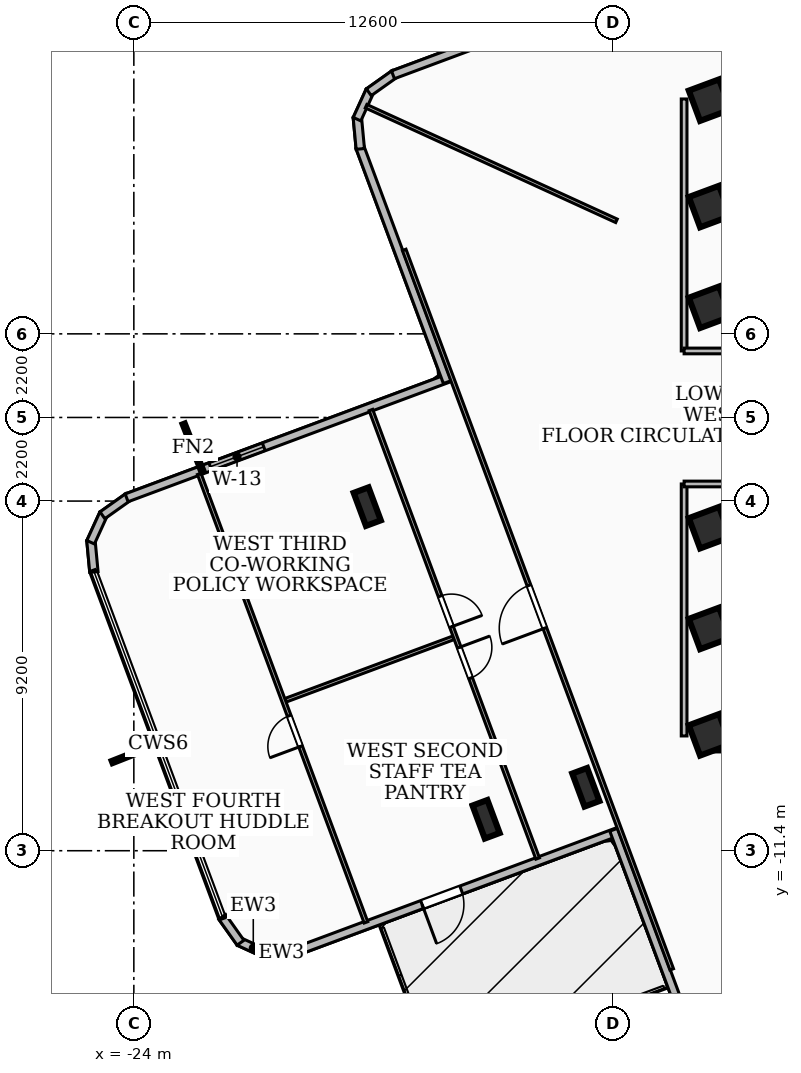
"""IFC4 building model, lengths in metres.
Left out: names, types, materials, properties, quantities, classifications, styles, units other than length and angle.
Written with IfcOpenShell. Run it as: python <this file> out.ifc"""

import sys

from ifc_helpers import new_model, si_unit, direction, frame, frame_2d, origin, origin_2d, place, context, subcontext, project, spatial, rectangle, i_section, extrude, element, fill, save


model = new_model("IFC4")
c1 = context("Model", 3, precision=1e-05, world=origin(), true_north=direction((0.0, 1.0)))
c2 = subcontext(c1, "Body", "Model", "MODEL_VIEW")
j1 = project(units=[si_unit("LENGTHUNIT", "METRE"), si_unit("PLANEANGLEUNIT", "RADIAN")], contexts=[c1])
p1 = place(None, origin())
s1 = spatial("IfcSite", under=j1, at=p1, CompositionType="ELEMENT")
p2 = place(p1, origin())
s2 = spatial("IfcBuilding", under=s1, at=p2, CompositionType="ELEMENT")
p3 = place(p2, frame((0.0, 0.0, 170.28)))
s3 = spatial("IfcBuildingStorey", under=s2, at=p3, CompositionType="ELEMENT", Elevation=170.28)
for number, where, z_axis, x_axis in (
    (1, (-8.78, 8.535, 0.0), (0.0, 0.0, 1.0), (1.0, 0.0, 0.0)),
    (2, (8.78, -8.535, 0.0), (0.0, 0.0, 1.0), (-1.0, 0.0, 0.0)),
):
    element("IfcWall", number, at=place(p3, frame(where, z_axis=z_axis, x_axis=x_axis)), inside=s3, PredefinedType="SHEAR", context=c2, shape_type="SweptSolid", body=[
        extrude(rectangle(XDim=17.56, YDim=0.45, at=frame_2d((8.78, 0.0))), origin(), (0.0, 0.0, 1.0), 3.34),
    ])
for number, where, z_axis, x_axis in (
    (3, (-8.85, -5.55, 0.0), (0.0, 0.0, 1.0), (0.937, 0.349, 0.0)),
    (4, (-8.85, -2.9, 0.0), (0.0, 0.0, 1.0), (0.937, 0.349, 0.0)),
    (5, (-8.85, 2.9, 0.0), (0.0, 0.0, 1.0), (0.937, 0.349, 0.0)),
    (6, (-8.85, 5.55, 0.0), (0.0, 0.0, 1.0), (0.937, 0.349, 0.0)),
    (7, (-8.85, 8.35, 0.0), (0.0, 0.0, 1.0), (0.937, 0.349, 0.0)),
    (8, (-8.85, -8.35, 0.0), (0.0, 0.0, 1.0), (0.937, 0.349, 0.0)),
):
    element("IfcColumn", number, at=place(p3, frame(where, z_axis=z_axis, x_axis=x_axis)), inside=s3, PredefinedType="COLUMN", context=c2, shape_type="SweptSolid", body=[
        extrude(rectangle(XDim=0.85, YDim=0.85, at=origin_2d()), origin(), (0.0, 0.0, 1.0), 3.6),
    ])
for number, where, z_axis, x_axis in (
    (9, (-17.858, -2.346, 0.0), (0.0, 0.0, 1.0), (0.937, 0.349, 0.0)),
    (10, (-12.106, -9.731, 0.0), (0.0, 0.0, 1.0), (0.937, 0.349, 0.0)),
    (11, (-20.535, -3.788, 0.0), (0.0, 0.0, 1.0), (0.937, 0.349, 0.0)),
    (12, (-14.731, -10.573, 0.0), (0.0, 0.0, 1.0), (0.937, 0.349, 0.0)),
):
    element("IfcColumn", number, at=place(p3, frame(where, z_axis=z_axis, x_axis=x_axis)), inside=s3, PredefinedType="COLUMN", context=c2, shape_type="SweptSolid", body=[
        extrude(i_section(OverallWidth=0.418, OverallDepth=0.927, WebThickness=0.019, FlangeThickness=0.032, at=origin_2d()), origin(), (0.0, 0.0, 1.0), 3.6),
    ])
p4 = place(p3, frame((-11.26, -10.898, 0.0), z_axis=(0.0, 0.0, 1.0), x_axis=(-0.937248687931, -0.348661579431, 0.0)))
e13 = element("IfcWall", 13, at=p4, inside=s3, PredefinedType="SOLIDWALL", context=c2, shape_type="SweptSolid", body=[
    extrude(rectangle(XDim=9.057, YDim=0.22, at=frame_2d((4.529, 0.0))), origin(), (0.0, 0.0, 1.0), 2.72),
])
p5 = place(p4, frame((4.4, 0.0, 0.0)))
e14 = element("IfcOpeningElement", 14, at=p5, cuts=e13, PredefinedType="OPENING", context=c2, shape_type="SweptSolid", body=[
    extrude(rectangle(XDim=1.1, YDim=2.1, at=frame_2d((0.55, 1.05))), frame((0.0, 0.12, 0.0), z_axis=(0.0, -1.0, 0.0), x_axis=(1.0, 0.0, 0.0)), (0.0, 0.0, 1.0), 0.24),
])
p6 = place(p3, frame((-19.701, -14.045, 0.0), z_axis=(0.0, 0.0, 1.0), x_axis=(-0.99561041007, -0.093594398126, 0.0)))
e15 = element("IfcWall", 15, at=p6, inside=s3, PredefinedType="SOLIDWALL", context=c2, shape_type="SweptSolid", body=[
    extrude(rectangle(XDim=0.835, YDim=0.22, at=frame_2d((0.417, 0.0))), origin(), (0.0, 0.0, 1.0), 3.34),
])
p7 = place(p3, frame((-20.484, -14.131, 0.0), z_axis=(0.0, 0.0, 1.0), x_axis=(-0.909927497245, 0.41476734413, 0.0)))
e16 = element("IfcWall", 16, at=p7, inside=s3, PredefinedType="SOLIDWALL", context=c2, shape_type="SweptSolid", body=[
    extrude(rectangle(XDim=0.82, YDim=0.22, at=frame_2d((0.41, 0.0))), origin(), (0.0, 0.0, 1.0), 3.34),
])
p8 = place(p3, frame((-21.193, -13.821, 0.0), z_axis=(0.0, 0.0, 1.0), x_axis=(-0.578269277984, 0.815845967165, 0.0)))
e17 = element("IfcWall", 17, at=p8, inside=s3, PredefinedType="SOLIDWALL", context=c2, shape_type="SweptSolid", body=[
    extrude(rectangle(XDim=0.833, YDim=0.22, at=frame_2d((0.417, 0.0))), origin(), (0.0, 0.0, 1.0), 3.34),
])
p9 = place(p3, frame((-25.051, -4.066, 0.0), z_axis=(0.0, 0.0, 1.0), x_axis=(-0.093331645357, 0.995635075705, 0.0)))
e18 = element("IfcWall", 18, at=p9, inside=s3, PredefinedType="SOLIDWALL", context=c2, shape_type="SweptSolid", body=[
    extrude(rectangle(XDim=0.834, YDim=0.22, at=frame_2d((0.417, 0.0))), origin(), (0.0, 0.0, 1.0), 3.34),
])
p10 = place(p3, frame((-25.137, -3.283, 0.0), z_axis=(0.0, 0.0, 1.0), x_axis=(0.415865283719, 0.909426228892, 0.0)))
e19 = element("IfcWall", 19, at=p10, inside=s3, PredefinedType="SOLIDWALL", context=c2, shape_type="SweptSolid", body=[
    extrude(rectangle(XDim=0.82, YDim=0.22, at=frame_2d((0.41, 0.0))), origin(), (0.0, 0.0, 1.0), 3.34),
])
p11 = place(p3, frame((-24.826, -2.574, 0.0), z_axis=(0.0, 0.0, 1.0), x_axis=(0.815453569677, 0.578822490666, 0.0)))
e20 = element("IfcWall", 20, at=p11, inside=s3, PredefinedType="SOLIDWALL", context=c2, shape_type="SweptSolid", body=[
    extrude(rectangle(XDim=0.833, YDim=0.22, at=frame_2d((0.416, 0.0))), origin(), (0.0, 0.0, 1.0), 3.34),
])
p12 = place(p3, frame((-24.19, -2.115, 0.0), z_axis=(0.0, 0.0, 1.0), x_axis=(0.937261793021, 0.34862634918, 0.0)))
e21 = element("IfcWall", 21, at=p12, inside=s3, PredefinedType="SOLIDWALL", context=c2, shape_type="SweptSolid", body=[
    extrude(rectangle(XDim=9.058, YDim=0.22, at=frame_2d((4.529, 0.0))), origin(), (0.0, 0.0, 1.0), 3.34),
])
p13 = place(p12, frame((2.35, 0.0, 0.85)))
e22 = element("IfcOpeningElement", 22, at=p13, cuts=e21, PredefinedType="OPENING", context=c2, shape_type="SweptSolid", body=[
    extrude(rectangle(XDim=1.5, YDim=1.8, at=frame_2d((0.75, 0.9))), frame((0.0, 0.12, 0.0), z_axis=(0.0, -1.0, 0.0), x_axis=(1.0, 0.0, 0.0)), (0.0, 0.0, 1.0), 0.24),
])
p14 = place(p3, frame((-15.751, 0.93, 0.0), z_axis=(0.0, 0.0, 1.0), x_axis=(-0.348729932868, 0.937223257246, 0.0)))
e23 = element("IfcWall", 23, at=p14, inside=s3, PredefinedType="SOLIDWALL", context=c2, shape_type="SweptSolid", body=[
    extrude(rectangle(XDim=6.598, YDim=0.22, at=frame_2d((3.299, 0.0))), origin(), (0.0, 0.0, 1.0), 3.34),
])
p15 = place(p3, frame((-18.041, 7.066, 0.0), z_axis=(0.0, 0.0, 1.0), x_axis=(-0.09330446586, 0.995637623159, 0.0)))
e24 = element("IfcWall", 24, at=p15, inside=s3, PredefinedType="SOLIDWALL", context=c2, shape_type="SweptSolid", body=[
    extrude(rectangle(XDim=0.835, YDim=0.22, at=frame_2d((0.417, 0.0))), origin(), (0.0, 0.0, 1.0), 3.34),
])
p16 = place(p3, frame((-18.127, 7.849, 0.0), z_axis=(0.0, 0.0, 1.0), x_axis=(0.415083126143, 0.909783489843, 0.0)))
e25 = element("IfcWall", 25, at=p16, inside=s3, PredefinedType="SOLIDWALL", context=c2, shape_type="SweptSolid", body=[
    extrude(rectangle(XDim=0.819, YDim=0.22, at=frame_2d((0.409, 0.0))), origin(), (0.0, 0.0, 1.0), 3.34),
])
p17 = place(p3, frame((-17.817, 8.557, 0.0), z_axis=(0.0, 0.0, 1.0), x_axis=(0.815315167698, 0.579017424022, 0.0)))
e26 = element("IfcWall", 26, at=p17, inside=s3, PredefinedType="SOLIDWALL", context=c2, shape_type="SweptSolid", body=[
    extrude(rectangle(XDim=0.833, YDim=0.22, at=frame_2d((0.417, 0.0))), origin(), (0.0, 0.0, 1.0), 3.34),
])
p18 = place(p3, frame((-17.181, 9.016, 0.0), z_axis=(0.0, 0.0, 1.0), x_axis=(0.937216908499, 0.34874699486, 0.0)))
e27 = element("IfcWall", 27, at=p18, inside=s3, PredefinedType="SOLIDWALL", context=c2, shape_type="SweptSolid", body=[
    extrude(rectangle(XDim=6.758, YDim=0.22, at=frame_2d((3.379, 0.0))), origin(), (0.0, 0.0, 1.0), 3.34),
])
p19 = place(p3, frame((-9.016, -17.181, 0.0), z_axis=(0.0, 0.0, 1.0), x_axis=(-0.34874699486, 0.937216908499, 0.0)))
e28 = element("IfcWall", 28, at=p19, inside=s3, PredefinedType="SOLIDWALL", context=c2, shape_type="SweptSolid", body=[
    extrude(rectangle(XDim=6.758, YDim=0.22, at=frame_2d((3.379, 0.0))), origin(), (0.0, 0.0, 1.0), 2.72),
])
p20 = place(p3, frame((-9.52, 1.75, 0.0), z_axis=(0.0, 0.0, 1.0), x_axis=(0.0, 1.0, 0.0)))
e29 = element("IfcWall", 29, at=p20, inside=s3, PredefinedType="PARTITIONING", context=c2, shape_type="SweptSolid", body=[
    extrude(rectangle(XDim=6.63, YDim=0.15, at=frame_2d((3.315, 0.0))), origin(), (0.0, 0.0, 1.0), 3.34),
])
p21 = place(p3, frame((-7.85, 1.75, 0.0), z_axis=(0.0, 0.0, 1.0), x_axis=(-1.0, 0.0, 0.0)))
e30 = element("IfcWall", 30, at=p21, inside=s3, PredefinedType="PARTITIONING", context=c2, shape_type="SweptSolid", body=[
    extrude(rectangle(XDim=1.67, YDim=0.15, at=frame_2d((0.835, 0.0))), origin(), (0.0, 0.0, 1.0), 2.57),
])
p22 = place(p3, frame((-9.52, -8.38, 0.0), z_axis=(0.0, 0.0, 1.0), x_axis=(0.0, 1.0, 0.0)))
e31 = element("IfcWall", 31, at=p22, inside=s3, PredefinedType="PARTITIONING", context=c2, shape_type="SweptSolid", body=[
    extrude(rectangle(XDim=6.63, YDim=0.15, at=frame_2d((3.315, 0.0))), origin(), (0.0, 0.0, 1.0), 2.644),
])
p23 = place(p3, frame((-7.85, -1.75, 0.0), z_axis=(0.0, 0.0, 1.0), x_axis=(-1.0, 0.0, 0.0)))
e32 = element("IfcWall", 32, at=p23, inside=s3, PredefinedType="PARTITIONING", context=c2, shape_type="SweptSolid", body=[
    extrude(rectangle(XDim=1.67, YDim=0.15, at=frame_2d((0.835, 0.0))), origin(), (0.0, 0.0, 1.0), 2.57),
])
p24 = place(p3, frame((-11.3, 5.174, 0.0), z_axis=(0.0, 0.0, 1.0), x_axis=(-0.909275268701, 0.416195249528, 0.0)))
e33 = element("IfcWall", 33, at=p24, inside=s3, PredefinedType="PARTITIONING", context=c2, shape_type="SweptSolid", body=[
    extrude(rectangle(XDim=7.246, YDim=0.1, at=frame_2d((3.623, 0.0))), origin(), (0.0, 0.0, 1.0), 3.34),
])
p25 = place(p3, frame((-9.846, -14.522, 0.0), z_axis=(0.0, 0.0, 1.0), x_axis=(-0.348543090668, 0.937292757866, 0.0)))
e34 = element("IfcWall", 34, at=p25, inside=s3, PredefinedType="PARTITIONING", context=c2, shape_type="SweptSolid", body=[
    extrude(rectangle(XDim=20.198, YDim=0.1, at=frame_2d((10.099, 0.0))), origin(), (0.0, 0.0, 1.0), 2.644),
])
p26 = place(p25, frame((9.579, 0.0, 0.0)))
e35 = element("IfcOpeningElement", 35, at=p26, cuts=e34, PredefinedType="OPENING", context=c2, shape_type="SweptSolid", body=[
    extrude(rectangle(XDim=1.2, YDim=2.1, at=frame_2d((0.6, 1.05))), frame((0.0, 0.06, 0.0), z_axis=(0.0, -1.0, 0.0), x_axis=(1.0, 0.0, 0.0)), (0.0, 0.0, 1.0), 0.12),
])
p27 = place(p3, frame((-15.596, -5.8, 0.0), z_axis=(0.0, 0.0, 1.0), x_axis=(-0.937258557626, -0.348635047229, 0.0)))
e36 = element("IfcWall", 36, at=p27, inside=s3, PredefinedType="PARTITIONING", context=c2, shape_type="SweptSolid", body=[
    extrude(rectangle(XDim=4.701, YDim=0.1, at=frame_2d((2.351, 0.0))), origin(), (0.0, 0.0, 1.0), 2.793),
])
p28 = place(p3, frame((-17.762, 0.196, 0.0), z_axis=(0.0, 0.0, 1.0), x_axis=(0.348514653153, -0.937303332192, 0.0)))
e37 = element("IfcWall", 37, at=p28, inside=s3, PredefinedType="PARTITIONING", context=c2, shape_type="SweptSolid", body=[
    extrude(rectangle(XDim=12.59, YDim=0.1, at=frame_2d((6.295, 0.0))), origin(), (0.0, 0.0, 1.0), 2.644),
])
p29 = place(p28, frame((5.225, 0.0, 0.0)))
e38 = element("IfcOpeningElement", 38, at=p29, cuts=e37, PredefinedType="OPENING", context=c2, shape_type="SweptSolid", body=[
    extrude(rectangle(XDim=0.86, YDim=2.04, at=frame_2d((0.43, 1.02))), frame((0.0, 0.06, 0.0), z_axis=(0.0, -1.0, 0.0), x_axis=(1.0, 0.0, 0.0)), (0.0, 0.0, 1.0), 0.12),
])
p30 = place(p28, frame((6.665, 0.0, 0.0)))
e39 = element("IfcOpeningElement", 39, at=p30, cuts=e37, PredefinedType="OPENING", context=c2, shape_type="SweptSolid", body=[
    extrude(rectangle(XDim=0.86, YDim=2.04, at=frame_2d((0.43, 1.02))), frame((0.0, 0.06, 0.0), z_axis=(0.0, -1.0, 0.0), x_axis=(1.0, 0.0, 0.0)), (0.0, 0.0, 1.0), 0.12),
])
p31 = place(p3, frame((-17.892, -13.285, 0.0), z_axis=(0.0, 0.0, 1.0), x_axis=(-0.348514653153, 0.937303332192, 0.0)))
e40 = element("IfcWall", 40, at=p31, inside=s3, PredefinedType="PARTITIONING", context=c2, shape_type="SweptSolid", body=[
    extrude(rectangle(XDim=12.59, YDim=0.1, at=frame_2d((6.295, 0.0))), origin(), (0.0, 0.0, 1.0), 3.34),
])
p32 = place(p31, frame((4.94, 0.0, 0.0)))
e41 = element("IfcOpeningElement", 41, at=p32, cuts=e40, PredefinedType="OPENING", context=c2, shape_type="SweptSolid", body=[
    extrude(rectangle(XDim=0.86, YDim=2.04, at=frame_2d((0.43, 1.02))), frame((0.0, 0.06, 0.0), z_axis=(0.0, -1.0, 0.0), x_axis=(1.0, 0.0, 0.0)), (0.0, 0.0, 1.0), 0.12),
])
p33 = place(p5, origin())
e42 = element("IfcDoor", 42, at=p33, inside=s3, OperationType="SINGLE_SWING_RIGHT", PredefinedType="DOOR", context=c2, shape_type="SweptSolid", body=[
    extrude(rectangle(XDim=1.1, YDim=2.1, at=frame_2d((0.55, 1.05))), frame((0.0, 0.025, 0.0), z_axis=(0.0, -1.0, 0.0), x_axis=(1.0, 0.0, 0.0)), (0.0, 0.0, 1.0), 0.05),
])
fill(e14, e42)
p34 = place(p13, origin())
e43 = element("IfcWindow", 43, at=p34, inside=s3, PartitioningType="SINGLE_PANEL", PredefinedType="WINDOW", context=c2, shape_type="SweptSolid", body=[
    extrude(rectangle(XDim=1.5, YDim=1.8, at=frame_2d((0.75, 0.9))), frame((0.0, 0.03, 0.0), z_axis=(0.0, -1.0, 0.0), x_axis=(1.0, 0.0, 0.0)), (0.0, 0.0, 1.0), 0.06),
])
fill(e22, e43)
p35 = place(p26, origin())
e44 = element("IfcDoor", 44, at=p35, inside=s3, OperationType="SINGLE_SWING_LEFT", PredefinedType="DOOR", context=c2, shape_type="SweptSolid", body=[
    extrude(rectangle(XDim=1.2, YDim=2.1, at=frame_2d((0.6, 1.05))), frame((0.0, 0.025, 0.0), z_axis=(0.0, -1.0, 0.0), x_axis=(1.0, 0.0, 0.0)), (0.0, 0.0, 1.0), 0.05),
])
fill(e35, e44)
p36 = place(p29, origin())
e45 = element("IfcDoor", 45, at=p36, inside=s3, OperationType="SINGLE_SWING_RIGHT", PredefinedType="DOOR", context=c2, shape_type="SweptSolid", body=[
    extrude(rectangle(XDim=0.86, YDim=2.04, at=frame_2d((0.43, 1.02))), frame((0.0, 0.025, 0.0), z_axis=(0.0, -1.0, 0.0), x_axis=(1.0, 0.0, 0.0)), (0.0, 0.0, 1.0), 0.05),
])
fill(e38, e45)
p37 = place(p30, origin())
e46 = element("IfcDoor", 46, at=p37, inside=s3, OperationType="SINGLE_SWING_LEFT", PredefinedType="DOOR", context=c2, shape_type="SweptSolid", body=[
    extrude(rectangle(XDim=0.86, YDim=2.04, at=frame_2d((0.43, 1.02))), frame((0.0, 0.025, 0.0), z_axis=(0.0, -1.0, 0.0), x_axis=(1.0, 0.0, 0.0)), (0.0, 0.0, 1.0), 0.05),
])
fill(e39, e46)
p38 = place(p32, origin())
e47 = element("IfcDoor", 47, at=p38, inside=s3, OperationType="SINGLE_SWING_LEFT", PredefinedType="DOOR", context=c2, shape_type="SweptSolid", body=[
    extrude(rectangle(XDim=0.86, YDim=2.04, at=frame_2d((0.43, 1.02))), frame((0.0, 0.025, 0.0), z_axis=(0.0, -1.0, 0.0), x_axis=(1.0, 0.0, 0.0)), (0.0, 0.0, 1.0), 0.05),
])
fill(e41, e47)
save(model, sys.argv[1])
